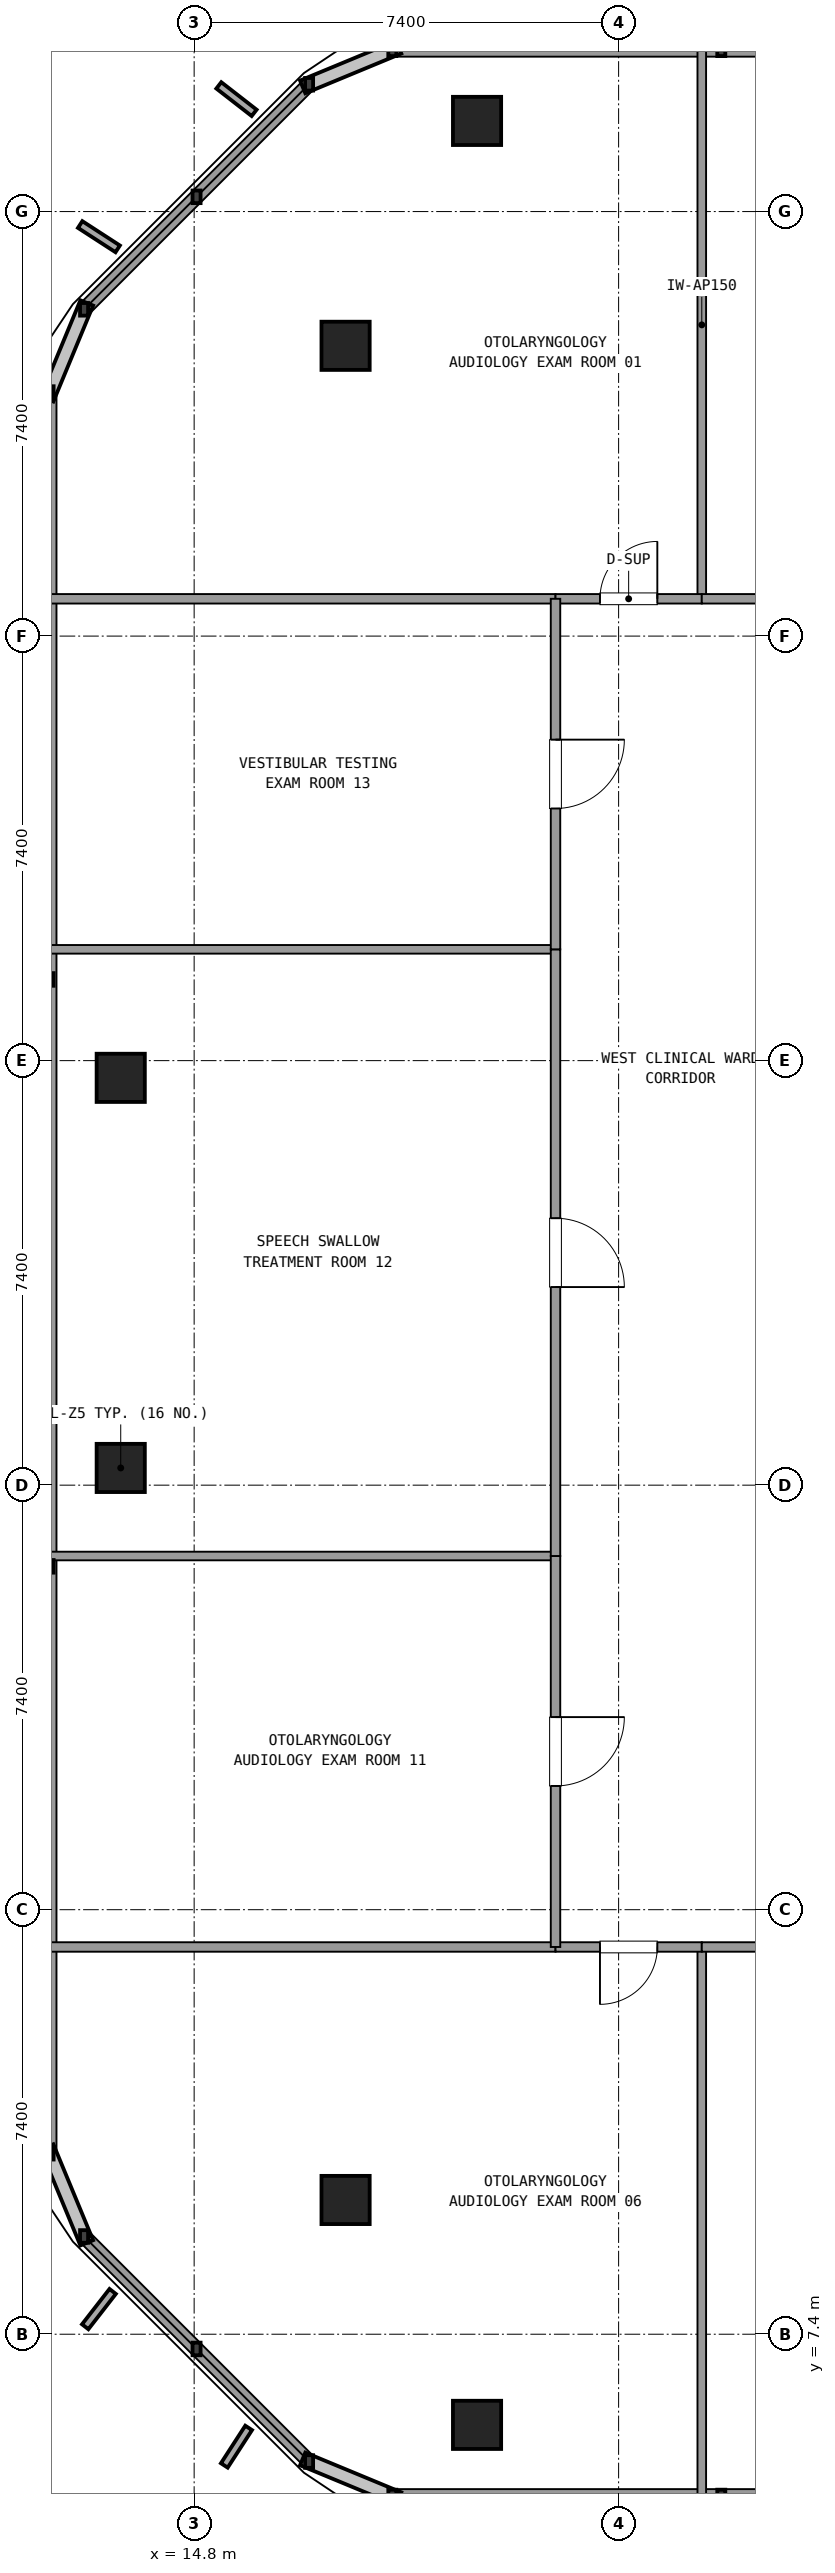
"""IFC4 building model, lengths in metres.
Left out: names, types, materials, properties, quantities, classifications, styles, units other than length and angle.
Written with IfcOpenShell. Run it as: python <this file> out.ifc"""

import sys

from ifc_helpers import new_model, si_unit, direction, frame, frame_2d, origin, origin_2d, place, context, subcontext, project, spatial, rectangle, extrude, element, fill, save


model = new_model("IFC4")
c1 = context("Model", 3, precision=1e-05, world=origin(), true_north=direction((0.0, 1.0)))
c2 = subcontext(c1, "Body", "Model", "MODEL_VIEW")
j1 = project(units=[si_unit("LENGTHUNIT", "METRE"), si_unit("PLANEANGLEUNIT", "RADIAN")], contexts=[c1])
p1 = place(None, origin())
s1 = spatial("IfcSite", under=j1, at=p1, CompositionType="ELEMENT")
p2 = place(p1, origin())
s2 = spatial("IfcBuilding", under=s1, at=p2, CompositionType="ELEMENT")
p3 = place(p2, frame((0.0, 0.0, 253.62)))
s3 = spatial("IfcBuildingStorey", under=s2, at=p3, CompositionType="ELEMENT", Elevation=253.62)
for number, where, z_axis, x_axis in (
    (1, (13.52, 22.5, 0.0), (0.0, 0.0, 1.0), (1.0, 0.0, 0.0)),
    (2, (17.44, 9.74, 0.0), (0.0, 0.0, 1.0), (1.0, 0.0, 0.0)),
    (3, (19.732, 5.82, 0.0), (0.0, 0.0, 1.0), (1.0, 0.0, 0.0)),
    (4, (19.732, 45.98, 0.0), (0.0, 0.0, 1.0), (1.0, 0.0, 0.0)),
    (5, (17.44, 42.06, 0.0), (0.0, 0.0, 1.0), (1.0, 0.0, 0.0)),
    (6, (13.52, 29.3, 0.0), (0.0, 0.0, 1.0), (1.0, 0.0, 0.0)),
):
    element("IfcColumn", number, at=place(p3, frame(where, z_axis=z_axis, x_axis=x_axis)), inside=s3, PredefinedType="COLUMN", context=c2, shape_type="SweptSolid", body=[
        extrude(rectangle(XDim=0.84, YDim=0.84, at=origin_2d()), origin(), (0.0, 0.0, 1.0), 3.6),
    ])
p4 = place(p3, frame((18.255, 4.58, 0.0), z_axis=(0.0, 0.0, 1.0), x_axis=(1.0, 0.0, 0.0)))
e7 = element("IfcWall", 7, at=p4, inside=s3, PredefinedType="SOLIDWALL", context=c2, shape_type="SweptSolid", body=[
    extrude(rectangle(XDim=17.204, YDim=0.24, at=frame_2d((8.602, 0.0))), origin(), (0.0, 0.0, 1.0), 0.85),
])
p5 = place(p3, frame((35.461, 47.22, 0.0), z_axis=(0.0, 0.0, 1.0), x_axis=(-1.0, 0.0, 0.0)))
e8 = element("IfcWall", 8, at=p5, inside=s3, PredefinedType="SOLIDWALL", context=c2, shape_type="SweptSolid", body=[
    extrude(rectangle(XDim=17.206, YDim=0.24, at=frame_2d((8.603, 0.0))), origin(), (0.0, 0.0, 1.0), 0.85),
])
p6 = place(p3, frame((16.804, 46.619, 0.0), z_axis=(0.0, 0.0, 1.0), x_axis=(-0.707106781187, -0.707106781187, 0.0)))
e9 = element("IfcWall", 9, at=p6, inside=s3, PredefinedType="SOLIDWALL", context=c2, shape_type="SweptSolid", body=[
    extrude(rectangle(XDim=5.548, YDim=0.24, at=frame_2d((2.774, 0.0))), origin(), (0.0, 0.0, 1.0), 0.85),
])
p7 = place(p3, frame((12.28, 41.245, 0.0), z_axis=(0.0, 0.0, 1.0), x_axis=(0.0, -1.0, 0.0)))
e10 = element("IfcWall", 10, at=p7, inside=s3, PredefinedType="SOLIDWALL", context=c2, shape_type="SweptSolid", body=[
    extrude(rectangle(XDim=30.69, YDim=0.24, at=frame_2d((15.345, 0.0))), origin(), (0.0, 0.0, 1.0), 0.85),
])
p8 = place(p3, frame((12.881, 9.104, 0.0), z_axis=(0.0, 0.0, 1.0), x_axis=(0.707084777957, -0.707128783731, 0.0)))
e11 = element("IfcWall", 11, at=p8, inside=s3, PredefinedType="SOLIDWALL", context=c2, shape_type="SweptSolid", body=[
    extrude(rectangle(XDim=5.548, YDim=0.24, at=frame_2d((2.774, 0.0))), origin(), (0.0, 0.0, 1.0), 0.85),
])
for number, where, z_axis, x_axis in (
    (12, (12.3, 37.65, 0.0), (0.0, 0.0, 1.0), (1.0, 0.0, 0.0)),
    (13, (12.3, 14.15, 0.0), (0.0, 0.0, 1.0), (1.0, 0.0, 0.0)),
):
    element("IfcWall", number, at=place(p3, frame(where, z_axis=z_axis, x_axis=x_axis)), inside=s3, PredefinedType="PARTITIONING", context=c2, shape_type="SweptSolid", body=[
        extrude(rectangle(XDim=8.8, YDim=0.165, at=frame_2d((4.4, 0.0))), origin(), (0.0, 0.0, 1.0), 2.61),
    ])
p9 = place(p3, frame((23.65, 37.65, 0.0), z_axis=(0.0, 0.0, 1.0), x_axis=(0.0, 1.0, 0.0)))
e14 = element("IfcWall", 14, at=p9, inside=s3, PredefinedType="PARTITIONING", context=c2, shape_type="SweptSolid", body=[
    extrude(rectangle(XDim=9.55, YDim=0.15, at=frame_2d((4.775, 0.0))), origin(), (0.0, 0.0, 1.0), 2.61),
])
p10 = place(p3, frame((21.1, 37.65, 0.0), z_axis=(0.0, 0.0, 1.0), x_axis=(1.0, 0.0, 0.0)))
e15 = element("IfcWall", 15, at=p10, inside=s3, PredefinedType="PARTITIONING", context=c2, shape_type="SweptSolid", body=[
    extrude(rectangle(XDim=2.55, YDim=0.165, at=frame_2d((1.275, 0.0))), origin(), (0.0, 0.0, 1.0), 2.61),
])
p11 = place(p10, frame((0.775, 0.0, 0.0)))
e16 = element("IfcOpeningElement", 16, at=p11, cuts=e15, PredefinedType="OPENING", context=c2, shape_type="SweptSolid", body=[
    extrude(rectangle(XDim=1.0, YDim=2.15, at=frame_2d((0.5, 1.075))), frame((0.0, 0.093, 0.0), z_axis=(0.0, -1.0, 0.0), x_axis=(1.0, 0.0, 0.0)), (0.0, 0.0, 1.0), 0.185),
])
p12 = place(p3, frame((23.65, 37.65, 0.0), z_axis=(0.0, 0.0, 1.0), x_axis=(1.0, 0.0, 0.0)))
e17 = element("IfcWall", 17, at=p12, inside=s3, PredefinedType="PARTITIONING", context=c2, shape_type="SweptSolid", body=[
    extrude(rectangle(XDim=11.55, YDim=0.165, at=frame_2d((5.775, 0.0))), origin(), (0.0, 0.0, 1.0), 2.61),
])
p13 = place(p12, frame((5.175, 0.0, 0.0)))
e18 = element("IfcOpeningElement", 18, at=p13, cuts=e17, PredefinedType="OPENING", context=c2, shape_type="SweptSolid", body=[
    extrude(rectangle(XDim=1.2, YDim=2.15, at=frame_2d((0.6, 1.075))), frame((0.0, 0.093, 0.0), z_axis=(0.0, -1.0, 0.0), x_axis=(1.0, 0.0, 0.0)), (0.0, 0.0, 1.0), 0.185),
])
p14 = place(p3, frame((23.65, 14.15, 0.0), z_axis=(0.0, 0.0, 1.0), x_axis=(0.0, -1.0, 0.0)))
e19 = element("IfcWall", 19, at=p14, inside=s3, PredefinedType="PARTITIONING", context=c2, shape_type="SweptSolid", body=[
    extrude(rectangle(XDim=9.55, YDim=0.15, at=frame_2d((4.775, 0.0))), origin(), (0.0, 0.0, 1.0), 2.61),
])
p15 = place(p3, frame((21.1, 14.15, 0.0), z_axis=(0.0, 0.0, 1.0), x_axis=(1.0, 0.0, 0.0)))
e20 = element("IfcWall", 20, at=p15, inside=s3, PredefinedType="PARTITIONING", context=c2, shape_type="SweptSolid", body=[
    extrude(rectangle(XDim=2.55, YDim=0.165, at=frame_2d((1.275, 0.0))), origin(), (0.0, 0.0, 1.0), 2.61),
])
p16 = place(p15, frame((0.775, 0.0, 0.0)))
e21 = element("IfcOpeningElement", 21, at=p16, cuts=e20, PredefinedType="OPENING", context=c2, shape_type="SweptSolid", body=[
    extrude(rectangle(XDim=1.0, YDim=2.15, at=frame_2d((0.5, 1.075))), frame((0.0, 0.093, 0.0), z_axis=(0.0, -1.0, 0.0), x_axis=(1.0, 0.0, 0.0)), (0.0, 0.0, 1.0), 0.185),
])
p17 = place(p3, frame((23.65, 14.15, 0.0), z_axis=(0.0, 0.0, 1.0), x_axis=(1.0, 0.0, 0.0)))
e22 = element("IfcWall", 22, at=p17, inside=s3, PredefinedType="PARTITIONING", context=c2, shape_type="SweptSolid", body=[
    extrude(rectangle(XDim=9.391, YDim=0.165, at=frame_2d((4.696, 0.0))), origin(), (0.0, 0.0, 1.0), 2.61),
])
p18 = place(p17, frame((4.095, 0.0, 0.0)))
e23 = element("IfcOpeningElement", 23, at=p18, cuts=e22, PredefinedType="OPENING", context=c2, shape_type="SweptSolid", body=[
    extrude(rectangle(XDim=1.2, YDim=2.15, at=frame_2d((0.6, 1.075))), frame((0.0, 0.093, 0.0), z_axis=(0.0, -1.0, 0.0), x_axis=(1.0, 0.0, 0.0)), (0.0, 0.0, 1.0), 0.185),
])
p19 = place(p3, frame((21.1, 20.965, 0.0), z_axis=(0.0, 0.0, 1.0), x_axis=(-1.0, 0.0, 0.0)))
e24 = element("IfcWall", 24, at=p19, inside=s3, PredefinedType="PARTITIONING", context=c2, shape_type="SweptSolid", body=[
    extrude(rectangle(XDim=8.8, YDim=0.15, at=frame_2d((4.4, 0.0))), origin(), (0.0, 0.0, 1.0), 2.61),
])
p20 = place(p3, frame((21.1, 14.15, 0.0), z_axis=(0.0, 0.0, 1.0), x_axis=(0.0, 1.0, 0.0)))
e25 = element("IfcWall", 25, at=p20, inside=s3, PredefinedType="PARTITIONING", context=c2, shape_type="SweptSolid", body=[
    extrude(rectangle(XDim=6.815, YDim=0.165, at=frame_2d((3.408, 0.0))), origin(), (0.0, 0.0, 1.0), 2.61),
])
p21 = place(p20, frame((2.807, 0.0, 0.0)))
e26 = element("IfcOpeningElement", 26, at=p21, cuts=e25, PredefinedType="OPENING", context=c2, shape_type="SweptSolid", body=[
    extrude(rectangle(XDim=1.2, YDim=2.15, at=frame_2d((0.6, 1.075))), frame((0.0, 0.093, 0.0), z_axis=(0.0, -1.0, 0.0), x_axis=(1.0, 0.0, 0.0)), (0.0, 0.0, 1.0), 0.185),
])
p22 = place(p3, frame((21.1, 31.54, 0.0), z_axis=(0.0, 0.0, 1.0), x_axis=(-1.0, 0.0, 0.0)))
e27 = element("IfcWall", 27, at=p22, inside=s3, PredefinedType="PARTITIONING", context=c2, shape_type="SweptSolid", body=[
    extrude(rectangle(XDim=8.8, YDim=0.15, at=frame_2d((4.4, 0.0))), origin(), (0.0, 0.0, 1.0), 2.61),
])
p23 = place(p3, frame((21.1, 20.965, 0.0), z_axis=(0.0, 0.0, 1.0), x_axis=(0.0, 1.0, 0.0)))
e28 = element("IfcWall", 28, at=p23, inside=s3, PredefinedType="PARTITIONING", context=c2, shape_type="SweptSolid", body=[
    extrude(rectangle(XDim=10.575, YDim=0.165, at=frame_2d((5.288, 0.0))), origin(), (0.0, 0.0, 1.0), 2.61),
])
p24 = place(p23, frame((4.688, 0.0, 0.0)))
e29 = element("IfcOpeningElement", 29, at=p24, cuts=e28, PredefinedType="OPENING", context=c2, shape_type="SweptSolid", body=[
    extrude(rectangle(XDim=1.2, YDim=2.15, at=frame_2d((0.6, 1.075))), frame((0.0, 0.093, 0.0), z_axis=(0.0, -1.0, 0.0), x_axis=(1.0, 0.0, 0.0)), (0.0, 0.0, 1.0), 0.185),
])
p25 = place(p3, frame((21.1, 31.54, 0.0), z_axis=(0.0, 0.0, 1.0), x_axis=(0.0, 1.0, 0.0)))
e30 = element("IfcWall", 30, at=p25, inside=s3, PredefinedType="PARTITIONING", context=c2, shape_type="SweptSolid", body=[
    extrude(rectangle(XDim=6.11, YDim=0.165, at=frame_2d((3.055, 0.0))), origin(), (0.0, 0.0, 1.0), 2.61),
])
p26 = place(p25, frame((2.455, 0.0, 0.0)))
e31 = element("IfcOpeningElement", 31, at=p26, cuts=e30, PredefinedType="OPENING", context=c2, shape_type="SweptSolid", body=[
    extrude(rectangle(XDim=1.2, YDim=2.15, at=frame_2d((0.6, 1.075))), frame((0.0, 0.093, 0.0), z_axis=(0.0, -1.0, 0.0), x_axis=(1.0, 0.0, 0.0)), (0.0, 0.0, 1.0), 0.185),
])
p27 = place(p11, origin())
e32 = element("IfcDoor", 32, at=p27, inside=s3, OperationType="SINGLE_SWING_RIGHT", PredefinedType="DOOR", context=c2, shape_type="SweptSolid", body=[
    extrude(rectangle(XDim=1.0, YDim=2.15, at=frame_2d((0.5, 1.075))), frame((0.0, 0.025, 0.0), z_axis=(0.0, -1.0, 0.0), x_axis=(1.0, 0.0, 0.0)), (0.0, 0.0, 1.0), 0.05),
])
fill(e16, e32)
p28 = place(p16, frame((1.0, 0.0, 0.0), z_axis=(0.0, 0.0, 1.0), x_axis=(-1.0, 0.0, 0.0)))
e33 = element("IfcDoor", 33, at=p28, inside=s3, OperationType="SINGLE_SWING_LEFT", PredefinedType="DOOR", context=c2, shape_type="SweptSolid", body=[
    extrude(rectangle(XDim=1.0, YDim=2.15, at=frame_2d((0.5, 1.075))), frame((0.0, 0.025, 0.0), z_axis=(0.0, -1.0, 0.0), x_axis=(1.0, 0.0, 0.0)), (0.0, 0.0, 1.0), 0.05),
])
fill(e21, e33)
p29 = place(p21, frame((1.2, 0.0, 0.0), z_axis=(0.0, 0.0, 1.0), x_axis=(-1.0, 0.0, 0.0)))
e34 = element("IfcDoor", 34, at=p29, inside=s3, OperationType="SINGLE_SWING_RIGHT", PredefinedType="DOOR", context=c2, shape_type="SweptSolid", body=[
    extrude(rectangle(XDim=1.2, YDim=2.15, at=frame_2d((0.6, 1.075))), frame((0.0, 0.025, 0.0), z_axis=(0.0, -1.0, 0.0), x_axis=(1.0, 0.0, 0.0)), (0.0, 0.0, 1.0), 0.05),
])
fill(e26, e34)
p30 = place(p24, frame((1.2, 0.0, 0.0), z_axis=(0.0, 0.0, 1.0), x_axis=(-1.0, 0.0, 0.0)))
e35 = element("IfcDoor", 35, at=p30, inside=s3, OperationType="SINGLE_SWING_LEFT", PredefinedType="DOOR", context=c2, shape_type="SweptSolid", body=[
    extrude(rectangle(XDim=1.2, YDim=2.15, at=frame_2d((0.6, 1.075))), frame((0.0, 0.025, 0.0), z_axis=(0.0, -1.0, 0.0), x_axis=(1.0, 0.0, 0.0)), (0.0, 0.0, 1.0), 0.05),
])
fill(e29, e35)
p31 = place(p26, frame((1.2, 0.0, 0.0), z_axis=(0.0, 0.0, 1.0), x_axis=(-1.0, 0.0, 0.0)))
e36 = element("IfcDoor", 36, at=p31, inside=s3, OperationType="SINGLE_SWING_RIGHT", PredefinedType="DOOR", context=c2, shape_type="SweptSolid", body=[
    extrude(rectangle(XDim=1.2, YDim=2.15, at=frame_2d((0.6, 1.075))), frame((0.0, 0.025, 0.0), z_axis=(0.0, -1.0, 0.0), x_axis=(1.0, 0.0, 0.0)), (0.0, 0.0, 1.0), 0.05),
])
fill(e31, e36)
save(model, sys.argv[1])
